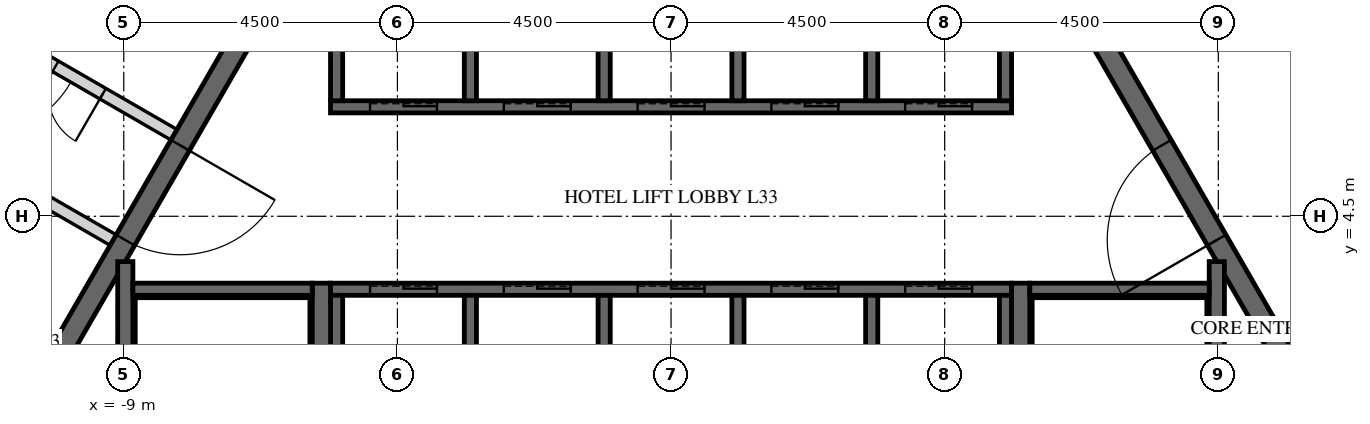
"""IFC4 building model, lengths in metres.
Left out: names, types, materials, properties, quantities, classifications, styles, units other than length and angle.
Written with IfcOpenShell. Run it as: python <this file> out.ifc"""

import sys

from ifc_helpers import new_model, si_unit, direction, frame, frame_2d, origin, place, context, subcontext, project, spatial, polyline, rectangle, outline, extrude, element, fill, save


model = new_model("IFC4")
c1 = context("Model", 3, precision=1e-05, world=origin(), true_north=direction((0.0, 1.0)))
c2 = subcontext(c1, "Body", "Model", "MODEL_VIEW")
j1 = project(units=[si_unit("LENGTHUNIT", "METRE"), si_unit("PLANEANGLEUNIT", "RADIAN")], contexts=[c1])
p1 = place(None, origin())
s1 = spatial("IfcSite", under=j1, at=p1, CompositionType="ELEMENT")
p2 = place(p1, origin())
s2 = spatial("IfcBuilding", under=s1, at=p2, CompositionType="ELEMENT")
p3 = place(p2, frame((0.0, 0.0, 142.8)))
s3 = spatial("IfcBuildingStorey", under=s2, at=p3, CompositionType="ELEMENT", Elevation=142.8)
p4 = place(p3, frame((-7.91, 13.7, -0.15), z_axis=(0.0, 0.0, 1.0), x_axis=(-0.499999880136, -0.866025472988, 0.0)))
e1 = element("IfcWall", 1, at=p4, inside=s3, PredefinedType="SHEAR", context=c2, shape_type="SweptSolid", body=[
    extrude(outline(polyline([(-0.173, -0.3), (15.993, -0.3), (15.646, 0.3), (0.173, 0.3), (-0.173, -0.3)])), origin(), (0.0, 0.0, 1.0), 3.75),
])
p5 = place(p4, frame((7.039, 0.0, 0.15)))
e2 = element("IfcOpeningElement", 2, at=p5, cuts=e1, PredefinedType="OPENING", context=c2, shape_type="SweptSolid", body=[
    extrude(rectangle(XDim=1.8, YDim=2.4, at=frame_2d((0.9, 1.2))), frame((0.0, 0.31, 0.0), z_axis=(0.0, -1.0, 0.0), x_axis=(1.0, 0.0, 0.0)), (0.0, 0.0, 1.0), 0.62),
])
p6 = place(p3, frame((15.819, 0.0, -0.15), z_axis=(0.0, 0.0, 1.0), x_axis=(-0.499999880136, 0.866025472988, 0.0)))
e3 = element("IfcWall", 3, at=p6, inside=s3, PredefinedType="SHEAR", context=c2, shape_type="SweptSolid", body=[
    extrude(outline(polyline([(-0.173, -0.3), (15.993, -0.3), (15.646, 0.3), (0.173, 0.3), (-0.173, -0.3)])), origin(), (0.0, 0.0, 1.0), 3.75),
])
p7 = place(p6, frame((6.981, 0.0, 0.15)))
e4 = element("IfcOpeningElement", 4, at=p7, cuts=e3, PredefinedType="OPENING", context=c2, shape_type="SweptSolid", body=[
    extrude(rectangle(XDim=1.8, YDim=2.4, at=frame_2d((0.9, 1.2))), frame((0.0, 0.31, 0.0), z_axis=(0.0, -1.0, 0.0), x_axis=(1.0, 0.0, 0.0)), (0.0, 0.0, 1.0), 0.62),
])
p8 = place(p3, frame((-5.673, 9.825, -0.15), z_axis=(0.0, 0.0, 1.0), x_axis=(-0.499995046907, -0.866028263435, 0.0)))
e5 = element("IfcWall", 5, at=p8, inside=s3, PredefinedType="SHEAR", context=c2, shape_type="SweptSolid", body=[
    extrude(outline(polyline([(-0.101, -0.175), (11.446, -0.175), (11.244, 0.175), (0.101, 0.175), (-0.101, -0.175)])), origin(), (0.0, 0.0, 1.0), 3.75),
])
p9 = place(p8, frame((4.801, 0.0, 0.15)))
e6 = element("IfcOpeningElement", 6, at=p9, cuts=e5, PredefinedType="OPENING", context=c2, shape_type="SweptSolid", body=[
    extrude(rectangle(XDim=1.8, YDim=2.4, at=frame_2d((0.9, 1.2))), frame((0.0, 0.185, 0.0), z_axis=(0.0, -1.0, 0.0), x_axis=(1.0, 0.0, 0.0)), (0.0, 0.0, 1.0), 0.37),
])
p10 = place(p3, frame((11.345, 0.0, -0.15), z_axis=(0.0, 0.0, 1.0), x_axis=(-0.499995046907, 0.866028263435, 0.0)))
e7 = element("IfcWall", 7, at=p10, inside=s3, PredefinedType="SHEAR", context=c2, shape_type="SweptSolid", body=[
    extrude(outline(polyline([(-0.101, -0.175), (11.446, -0.175), (11.244, 0.175), (0.101, 0.175), (-0.101, -0.175)])), origin(), (0.0, 0.0, 1.0), 3.75),
])
p11 = place(p10, frame((4.744, 0.0, 0.15)))
e8 = element("IfcOpeningElement", 8, at=p11, cuts=e7, PredefinedType="OPENING", context=c2, shape_type="SweptSolid", body=[
    extrude(rectangle(XDim=1.8, YDim=2.4, at=frame_2d((0.9, 1.2))), frame((0.0, 0.185, 0.0), z_axis=(0.0, -1.0, 0.0), x_axis=(1.0, 0.0, 0.0)), (0.0, 0.0, 1.0), 0.37),
])
p12 = place(p3, frame((-5.6, 6.3, -0.25), z_axis=(0.0, 0.0, 1.0), x_axis=(1.0, 0.0, 0.0)))
e9 = element("IfcWall", 9, at=p12, inside=s3, PredefinedType="SHEAR", context=c2, shape_type="SweptSolid", body=[
    extrude(rectangle(XDim=11.2, YDim=0.2, at=frame_2d((5.6, 0.0))), origin(), (0.0, 0.0, 1.0), 3.9),
])
p13 = place(p12, frame((0.65, 0.0, 0.25)))
e10 = element("IfcOpeningElement", 10, at=p13, cuts=e9, PredefinedType="OPENING", context=c2, shape_type="SweptSolid", body=[
    extrude(rectangle(XDim=1.1, YDim=2.1, at=frame_2d((0.55, 1.05))), frame((0.0, 0.11, 0.0), z_axis=(0.0, -1.0, 0.0), x_axis=(1.0, 0.0, 0.0)), (0.0, 0.0, 1.0), 0.22),
])
p14 = place(p12, frame((2.85, 0.0, 0.25)))
e11 = element("IfcOpeningElement", 11, at=p14, cuts=e9, PredefinedType="OPENING", context=c2, shape_type="SweptSolid", body=[
    extrude(rectangle(XDim=1.1, YDim=2.1, at=frame_2d((0.55, 1.05))), frame((0.0, 0.11, 0.0), z_axis=(0.0, -1.0, 0.0), x_axis=(1.0, 0.0, 0.0)), (0.0, 0.0, 1.0), 0.22),
])
p15 = place(p12, frame((5.05, 0.0, 0.25)))
e12 = element("IfcOpeningElement", 12, at=p15, cuts=e9, PredefinedType="OPENING", context=c2, shape_type="SweptSolid", body=[
    extrude(rectangle(XDim=1.1, YDim=2.1, at=frame_2d((0.55, 1.05))), frame((0.0, 0.11, 0.0), z_axis=(0.0, -1.0, 0.0), x_axis=(1.0, 0.0, 0.0)), (0.0, 0.0, 1.0), 0.22),
])
p16 = place(p12, frame((7.25, 0.0, 0.25)))
e13 = element("IfcOpeningElement", 13, at=p16, cuts=e9, PredefinedType="OPENING", context=c2, shape_type="SweptSolid", body=[
    extrude(rectangle(XDim=1.1, YDim=2.1, at=frame_2d((0.55, 1.05))), frame((0.0, 0.11, 0.0), z_axis=(0.0, -1.0, 0.0), x_axis=(1.0, 0.0, 0.0)), (0.0, 0.0, 1.0), 0.22),
])
p17 = place(p12, frame((9.45, 0.0, 0.25)))
e14 = element("IfcOpeningElement", 14, at=p17, cuts=e9, PredefinedType="OPENING", context=c2, shape_type="SweptSolid", body=[
    extrude(rectangle(XDim=1.1, YDim=2.1, at=frame_2d((0.55, 1.05))), frame((0.0, 0.11, 0.0), z_axis=(0.0, -1.0, 0.0), x_axis=(1.0, 0.0, 0.0)), (0.0, 0.0, 1.0), 0.22),
])
for number, where, z_axis, x_axis in (
    (15, (-5.5, 6.4, -0.25), (0.0, 0.0, 1.0), (0.0, 1.0, 0.0)),
    (16, (-3.3, 6.4, -0.25), (0.0, 0.0, 1.0), (0.0, 1.0, 0.0)),
    (17, (-1.1, 6.4, -0.25), (0.0, 0.0, 1.0), (0.0, 1.0, 0.0)),
    (18, (1.1, 6.4, -0.25), (0.0, 0.0, 1.0), (0.0, 1.0, 0.0)),
    (19, (3.3, 6.4, -0.25), (0.0, 0.0, 1.0), (0.0, 1.0, 0.0)),
    (20, (5.5, 6.4, -0.25), (0.0, 0.0, 1.0), (0.0, 1.0, 0.0)),
):
    element("IfcWall", number, at=place(p3, frame(where, z_axis=z_axis, x_axis=x_axis)), inside=s3, PredefinedType="SHEAR", context=c2, shape_type="SweptSolid", body=[
        extrude(rectangle(XDim=2.9, YDim=0.2, at=frame_2d((1.45, 0.0))), origin(), (0.0, 0.0, 1.0), 3.9),
    ])
p18 = place(p3, frame((-5.6, 3.3, -0.25), z_axis=(0.0, 0.0, 1.0), x_axis=(1.0, 0.0, 0.0)))
e21 = element("IfcWall", 21, at=p18, inside=s3, PredefinedType="SHEAR", context=c2, shape_type="SweptSolid", body=[
    extrude(rectangle(XDim=11.2, YDim=0.2, at=frame_2d((5.6, 0.0))), origin(), (0.0, 0.0, 1.0), 3.9),
])
p19 = place(p18, frame((0.65, 0.0, 0.25)))
e22 = element("IfcOpeningElement", 22, at=p19, cuts=e21, PredefinedType="OPENING", context=c2, shape_type="SweptSolid", body=[
    extrude(rectangle(XDim=1.1, YDim=2.1, at=frame_2d((0.55, 1.05))), frame((0.0, 0.11, 0.0), z_axis=(0.0, -1.0, 0.0), x_axis=(1.0, 0.0, 0.0)), (0.0, 0.0, 1.0), 0.22),
])
p20 = place(p18, frame((2.85, 0.0, 0.25)))
e23 = element("IfcOpeningElement", 23, at=p20, cuts=e21, PredefinedType="OPENING", context=c2, shape_type="SweptSolid", body=[
    extrude(rectangle(XDim=1.1, YDim=2.1, at=frame_2d((0.55, 1.05))), frame((0.0, 0.11, 0.0), z_axis=(0.0, -1.0, 0.0), x_axis=(1.0, 0.0, 0.0)), (0.0, 0.0, 1.0), 0.22),
])
p21 = place(p18, frame((5.05, 0.0, 0.25)))
e24 = element("IfcOpeningElement", 24, at=p21, cuts=e21, PredefinedType="OPENING", context=c2, shape_type="SweptSolid", body=[
    extrude(rectangle(XDim=1.1, YDim=2.1, at=frame_2d((0.55, 1.05))), frame((0.0, 0.11, 0.0), z_axis=(0.0, -1.0, 0.0), x_axis=(1.0, 0.0, 0.0)), (0.0, 0.0, 1.0), 0.22),
])
p22 = place(p18, frame((7.25, 0.0, 0.25)))
e25 = element("IfcOpeningElement", 25, at=p22, cuts=e21, PredefinedType="OPENING", context=c2, shape_type="SweptSolid", body=[
    extrude(rectangle(XDim=1.1, YDim=2.1, at=frame_2d((0.55, 1.05))), frame((0.0, 0.11, 0.0), z_axis=(0.0, -1.0, 0.0), x_axis=(1.0, 0.0, 0.0)), (0.0, 0.0, 1.0), 0.22),
])
p23 = place(p18, frame((9.45, 0.0, 0.25)))
e26 = element("IfcOpeningElement", 26, at=p23, cuts=e21, PredefinedType="OPENING", context=c2, shape_type="SweptSolid", body=[
    extrude(rectangle(XDim=1.1, YDim=2.1, at=frame_2d((0.55, 1.05))), frame((0.0, 0.11, 0.0), z_axis=(0.0, -1.0, 0.0), x_axis=(1.0, 0.0, 0.0)), (0.0, 0.0, 1.0), 0.22),
])
for number, where, z_axis, x_axis in (
    (27, (-5.5, 0.1, -0.25), (0.0, 0.0, 1.0), (0.0, 1.0, 0.0)),
    (28, (-3.3, 0.1, -0.25), (0.0, 0.0, 1.0), (0.0, 1.0, 0.0)),
    (29, (-1.1, 0.1, -0.25), (0.0, 0.0, 1.0), (0.0, 1.0, 0.0)),
    (30, (1.1, 0.1, -0.25), (0.0, 0.0, 1.0), (0.0, 1.0, 0.0)),
    (31, (3.3, 0.1, -0.25), (0.0, 0.0, 1.0), (0.0, 1.0, 0.0)),
    (32, (5.5, 0.1, -0.25), (0.0, 0.0, 1.0), (0.0, 1.0, 0.0)),
):
    element("IfcWall", number, at=place(p3, frame(where, z_axis=z_axis, x_axis=x_axis)), inside=s3, PredefinedType="SHEAR", context=c2, shape_type="SweptSolid", body=[
        extrude(rectangle(XDim=3.1, YDim=0.2, at=frame_2d((1.55, 0.0))), origin(), (0.0, 0.0, 1.0), 3.9),
    ])
p24 = place(p3, frame((-9.175, 4.109, 0.0), z_axis=(0.0, 0.0, 1.0), x_axis=(-0.865989465428, 0.500062241894, 0.0)))
e33 = element("IfcWall", 33, at=p24, inside=s3, PredefinedType="PARTITIONING", context=c2, shape_type="SweptSolid", body=[
    extrude(rectangle(XDim=3.4, YDim=0.2, at=frame_2d((1.7, 0.0))), origin(), (0.0, 0.0, 1.0), 3.65),
])
p25 = place(p24, frame((1.351, 0.0, 0.0)))
e34 = element("IfcOpeningElement", 34, at=p25, cuts=e33, PredefinedType="OPENING", context=c2, shape_type="SweptSolid", body=[
    extrude(rectangle(XDim=0.9, YDim=2.1, at=frame_2d((0.45, 1.05))), frame((0.0, 0.11, 0.0), z_axis=(0.0, -1.0, 0.0), x_axis=(1.0, 0.0, 0.0)), (0.0, 0.0, 1.0), 0.22),
])
p26 = place(p3, frame((-8.175, 5.841, 0.0), z_axis=(0.0, 0.0, 1.0), x_axis=(-0.866020560687, 0.500008388397, 0.0)))
e35 = element("IfcWall", 35, at=p26, inside=s3, PredefinedType="PARTITIONING", context=c2, shape_type="SweptSolid", body=[
    extrude(rectangle(XDim=3.4, YDim=0.2, at=frame_2d((1.7, 0.0))), origin(), (0.0, 0.0, 1.0), 3.65),
])
p27 = place(p26, frame((1.35, 0.0, 0.0)))
e36 = element("IfcOpeningElement", 36, at=p27, cuts=e35, PredefinedType="OPENING", context=c2, shape_type="SweptSolid", body=[
    extrude(rectangle(XDim=0.9, YDim=2.1, at=frame_2d((0.45, 1.05))), frame((0.0, 0.11, 0.0), z_axis=(0.0, -1.0, 0.0), x_axis=(1.0, 0.0, 0.0)), (0.0, 0.0, 1.0), 0.22),
])
p28 = place(p3, frame((5.75, -3.4, -0.25), z_axis=(0.0, 0.0, 1.0), x_axis=(0.0, 1.0, 0.0)))
e37 = element("IfcWall", 37, at=p28, inside=s3, PredefinedType="SHEAR", context=c2, shape_type="SweptSolid", body=[
    extrude(rectangle(XDim=6.8, YDim=0.3, at=frame_2d((3.4, 0.0))), origin(), (0.0, 0.0, 1.0), 3.9),
])
p29 = place(p3, frame((8.975, -3.755, -0.25), z_axis=(0.0, 0.0, 1.0), x_axis=(0.0, 1.0, 0.0)))
e38 = element("IfcWall", 38, at=p29, inside=s3, PredefinedType="SHEAR", context=c2, shape_type="SweptSolid", body=[
    extrude(rectangle(XDim=7.51, YDim=0.25, at=frame_2d((3.755, 0.0))), origin(), (0.0, 0.0, 1.0), 3.9),
])
p30 = place(p3, frame((5.9, 3.3, -0.25), z_axis=(0.0, 0.0, 1.0), x_axis=(1.0, 0.0, 0.0)))
e39 = element("IfcWall", 39, at=p30, inside=s3, PredefinedType="SHEAR", context=c2, shape_type="SweptSolid", body=[
    extrude(rectangle(XDim=2.95, YDim=0.2, at=frame_2d((1.475, 0.0))), origin(), (0.0, 0.0, 1.0), 3.9),
])
p31 = place(p3, frame((-5.75, -3.4, -0.25), z_axis=(0.0, 0.0, 1.0), x_axis=(0.0, 1.0, 0.0)))
e40 = element("IfcWall", 40, at=p31, inside=s3, PredefinedType="SHEAR", context=c2, shape_type="SweptSolid", body=[
    extrude(rectangle(XDim=6.8, YDim=0.3, at=frame_2d((3.4, 0.0))), origin(), (0.0, 0.0, 1.0), 3.9),
])
p32 = place(p3, frame((-8.975, -3.755, -0.25), z_axis=(0.0, 0.0, 1.0), x_axis=(0.0, 1.0, 0.0)))
e41 = element("IfcWall", 41, at=p32, inside=s3, PredefinedType="SHEAR", context=c2, shape_type="SweptSolid", body=[
    extrude(rectangle(XDim=7.51, YDim=0.25, at=frame_2d((3.755, 0.0))), origin(), (0.0, 0.0, 1.0), 3.9),
])
p33 = place(p3, frame((-8.85, 3.3, -0.25), z_axis=(0.0, 0.0, 1.0), x_axis=(1.0, 0.0, 0.0)))
e42 = element("IfcWall", 42, at=p33, inside=s3, PredefinedType="SHEAR", context=c2, shape_type="SweptSolid", body=[
    extrude(rectangle(XDim=2.95, YDim=0.2, at=frame_2d((1.475, 0.0))), origin(), (0.0, 0.0, 1.0), 3.9),
])
p34 = place(p9, origin())
e43 = element("IfcDoor", 43, at=p34, inside=s3, OperationType="DOUBLE_DOOR_SINGLE_SWING", PredefinedType="DOOR", context=c2, shape_type="SweptSolid", body=[
    extrude(rectangle(XDim=1.8, YDim=2.4, at=frame_2d((0.9, 1.2))), frame((0.0, 0.025, 0.0), z_axis=(0.0, -1.0, 0.0), x_axis=(1.0, 0.0, 0.0)), (0.0, 0.0, 1.0), 0.05),
])
fill(e6, e43)
p35 = place(p11, origin())
e44 = element("IfcDoor", 44, at=p35, inside=s3, OperationType="DOUBLE_DOOR_SINGLE_SWING", PredefinedType="DOOR", context=c2, shape_type="SweptSolid", body=[
    extrude(rectangle(XDim=1.8, YDim=2.4, at=frame_2d((0.9, 1.2))), frame((0.0, 0.025, 0.0), z_axis=(0.0, -1.0, 0.0), x_axis=(1.0, 0.0, 0.0)), (0.0, 0.0, 1.0), 0.05),
])
fill(e8, e44)
p36 = place(p27, origin())
e45 = element("IfcDoor", 45, at=p36, inside=s3, OperationType="SINGLE_SWING_LEFT", PredefinedType="DOOR", context=c2, shape_type="SweptSolid", body=[
    extrude(rectangle(XDim=0.9, YDim=2.1, at=frame_2d((0.45, 1.05))), frame((0.0, 0.025, 0.0), z_axis=(0.0, -1.0, 0.0), x_axis=(1.0, 0.0, 0.0)), (0.0, 0.0, 1.0), 0.05),
])
fill(e36, e45)
p37 = place(p13, origin())
e46 = element("IfcDoor", 46, at=p37, inside=s3, OperationType="SLIDING_TO_LEFT", PredefinedType="DOOR", context=c2, shape_type="SweptSolid", body=[
    extrude(rectangle(XDim=1.1, YDim=2.1, at=frame_2d((0.55, 1.05))), frame((0.0, 0.025, 0.0), z_axis=(0.0, -1.0, 0.0), x_axis=(1.0, 0.0, 0.0)), (0.0, 0.0, 1.0), 0.05),
])
fill(e10, e46)
p38 = place(p14, origin())
e47 = element("IfcDoor", 47, at=p38, inside=s3, OperationType="SLIDING_TO_LEFT", PredefinedType="DOOR", context=c2, shape_type="SweptSolid", body=[
    extrude(rectangle(XDim=1.1, YDim=2.1, at=frame_2d((0.55, 1.05))), frame((0.0, 0.025, 0.0), z_axis=(0.0, -1.0, 0.0), x_axis=(1.0, 0.0, 0.0)), (0.0, 0.0, 1.0), 0.05),
])
fill(e11, e47)
p39 = place(p15, origin())
e48 = element("IfcDoor", 48, at=p39, inside=s3, OperationType="SLIDING_TO_LEFT", PredefinedType="DOOR", context=c2, shape_type="SweptSolid", body=[
    extrude(rectangle(XDim=1.1, YDim=2.1, at=frame_2d((0.55, 1.05))), frame((0.0, 0.025, 0.0), z_axis=(0.0, -1.0, 0.0), x_axis=(1.0, 0.0, 0.0)), (0.0, 0.0, 1.0), 0.05),
])
fill(e12, e48)
p40 = place(p16, origin())
e49 = element("IfcDoor", 49, at=p40, inside=s3, OperationType="SLIDING_TO_LEFT", PredefinedType="DOOR", context=c2, shape_type="SweptSolid", body=[
    extrude(rectangle(XDim=1.1, YDim=2.1, at=frame_2d((0.55, 1.05))), frame((0.0, 0.025, 0.0), z_axis=(0.0, -1.0, 0.0), x_axis=(1.0, 0.0, 0.0)), (0.0, 0.0, 1.0), 0.05),
])
fill(e13, e49)
p41 = place(p17, origin())
e50 = element("IfcDoor", 50, at=p41, inside=s3, OperationType="SLIDING_TO_LEFT", PredefinedType="DOOR", context=c2, shape_type="SweptSolid", body=[
    extrude(rectangle(XDim=1.1, YDim=2.1, at=frame_2d((0.55, 1.05))), frame((0.0, 0.025, 0.0), z_axis=(0.0, -1.0, 0.0), x_axis=(1.0, 0.0, 0.0)), (0.0, 0.0, 1.0), 0.05),
])
fill(e14, e50)
p42 = place(p19, origin())
e51 = element("IfcDoor", 51, at=p42, inside=s3, OperationType="SLIDING_TO_LEFT", PredefinedType="DOOR", context=c2, shape_type="SweptSolid", body=[
    extrude(rectangle(XDim=1.1, YDim=2.1, at=frame_2d((0.55, 1.05))), frame((0.0, 0.025, 0.0), z_axis=(0.0, -1.0, 0.0), x_axis=(1.0, 0.0, 0.0)), (0.0, 0.0, 1.0), 0.05),
])
fill(e22, e51)
p43 = place(p20, origin())
e52 = element("IfcDoor", 52, at=p43, inside=s3, OperationType="SLIDING_TO_LEFT", PredefinedType="DOOR", context=c2, shape_type="SweptSolid", body=[
    extrude(rectangle(XDim=1.1, YDim=2.1, at=frame_2d((0.55, 1.05))), frame((0.0, 0.025, 0.0), z_axis=(0.0, -1.0, 0.0), x_axis=(1.0, 0.0, 0.0)), (0.0, 0.0, 1.0), 0.05),
])
fill(e23, e52)
p44 = place(p21, origin())
e53 = element("IfcDoor", 53, at=p44, inside=s3, OperationType="SLIDING_TO_LEFT", PredefinedType="DOOR", context=c2, shape_type="SweptSolid", body=[
    extrude(rectangle(XDim=1.1, YDim=2.1, at=frame_2d((0.55, 1.05))), frame((0.0, 0.025, 0.0), z_axis=(0.0, -1.0, 0.0), x_axis=(1.0, 0.0, 0.0)), (0.0, 0.0, 1.0), 0.05),
])
fill(e24, e53)
p45 = place(p22, origin())
e54 = element("IfcDoor", 54, at=p45, inside=s3, OperationType="SLIDING_TO_LEFT", PredefinedType="DOOR", context=c2, shape_type="SweptSolid", body=[
    extrude(rectangle(XDim=1.1, YDim=2.1, at=frame_2d((0.55, 1.05))), frame((0.0, 0.025, 0.0), z_axis=(0.0, -1.0, 0.0), x_axis=(1.0, 0.0, 0.0)), (0.0, 0.0, 1.0), 0.05),
])
fill(e25, e54)
p46 = place(p23, origin())
e55 = element("IfcDoor", 55, at=p46, inside=s3, OperationType="SLIDING_TO_LEFT", PredefinedType="DOOR", context=c2, shape_type="SweptSolid", body=[
    extrude(rectangle(XDim=1.1, YDim=2.1, at=frame_2d((0.55, 1.05))), frame((0.0, 0.025, 0.0), z_axis=(0.0, -1.0, 0.0), x_axis=(1.0, 0.0, 0.0)), (0.0, 0.0, 1.0), 0.05),
])
fill(e26, e55)
save(model, sys.argv[1])
